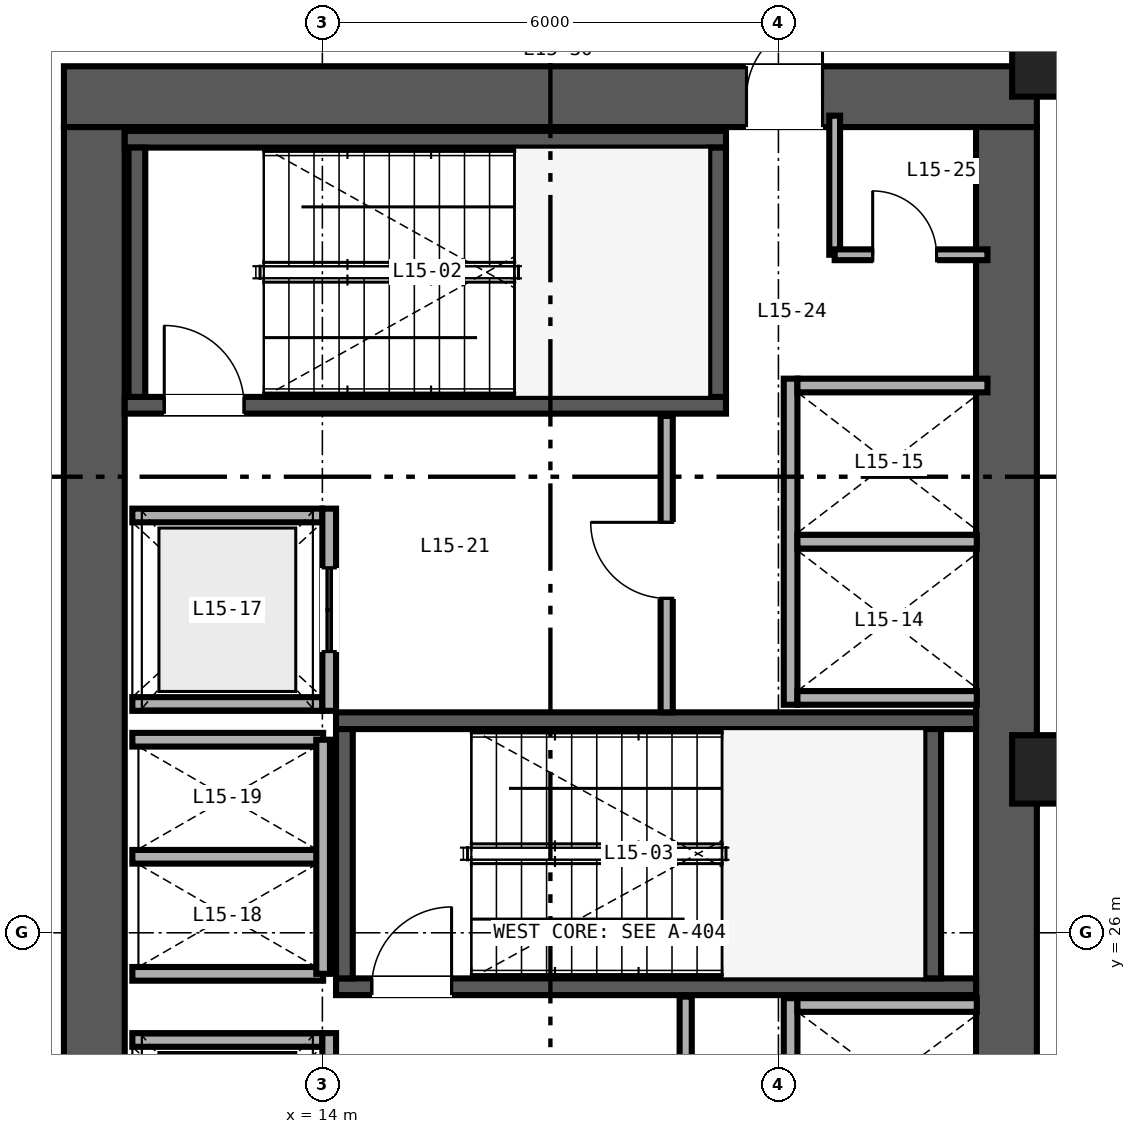
"""IFC4 building model, lengths in metres.
Left out: names, types, materials, properties, quantities, classifications, styles, units other than length and angle.
Written with IfcOpenShell. Run it as: python <this file> out.ifc"""

import sys

from ifc_helpers import new_model, si_unit, direction, frame, frame_2d, origin, origin_2d, place, context, subcontext, project, spatial, rectangle, hollow_rectangle, extrude, source, transform, mapped, element, fill, save


model = new_model("IFC4")
c1 = context("Model", 3, precision=1e-05, world=origin(), true_north=direction((0.0, 1.0)))
c2 = subcontext(c1, "Body", "Model", "MODEL_VIEW")
j1 = project(units=[si_unit("LENGTHUNIT", "METRE"), si_unit("PLANEANGLEUNIT", "RADIAN")], contexts=[c1])
p1 = place(None, origin())
s1 = spatial("IfcSite", under=j1, at=p1, CompositionType="ELEMENT")
p2 = place(p1, origin())
s2 = spatial("IfcBuilding", under=s1, at=p2, CompositionType="ELEMENT")
p3 = place(p2, frame((0.0, 0.0, 63.6)))
s3 = spatial("IfcBuildingStorey", under=s2, at=p3, CompositionType="ELEMENT", Elevation=63.6)
p4 = place(p3, frame((10.6, 37.0, 0.0), z_axis=(0.0, 0.0, 1.0), x_axis=(1.0, 0.0, 0.0)))
e1 = element("IfcWall", 1, at=p4, inside=s3, PredefinedType="SHEAR", context=c2, shape_type="SweptSolid", body=[
    extrude(rectangle(XDim=12.8, YDim=0.8, at=frame_2d((6.4, 0.0))), origin(), (0.0, 0.0, 1.0), 3.35),
])
p5 = place(p4, frame((8.98, 0.0, 0.0)))
e2 = element("IfcOpeningElement", 2, at=p5, cuts=e1, PredefinedType="OPENING", context=c2, shape_type="SweptSolid", body=[
    extrude(rectangle(XDim=1.0, YDim=2.15, at=frame_2d((0.5, 1.075))), frame((0.0, 0.41, 0.0), z_axis=(0.0, -1.0, 0.0), x_axis=(1.0, 0.0, 0.0)), (0.0, 0.0, 1.0), 0.82),
])
for number, where, z_axis, x_axis in (
    (3, (11.0, 15.4, 0.0), (0.0, 0.0, 1.0), (0.0, 1.0, 0.0)),
    (4, (23.0, 15.4, 0.0), (0.0, 0.0, 1.0), (0.0, 1.0, 0.0)),
):
    element("IfcWall", number, at=place(p3, frame(where, z_axis=z_axis, x_axis=x_axis)), inside=s3, PredefinedType="SHEAR", context=c2, shape_type="SweptSolid", body=[
        extrude(rectangle(XDim=21.2, YDim=0.8, at=frame_2d((10.6, 0.0))), origin(), (0.0, 0.0, 1.0), 3.35),
    ])
p6 = place(p3, frame((11.4, 32.94, 0.0), z_axis=(0.0, 0.0, 1.0), x_axis=(1.0, 0.0, 0.0)))
e5 = element("IfcWall", 5, at=p6, inside=s3, PredefinedType="SHEAR", context=c2, shape_type="SweptSolid", body=[
    extrude(rectangle(XDim=7.91, YDim=0.22, at=frame_2d((3.955, 0.0))), origin(), (0.0, 0.0, 1.0), 3.4),
])
p7 = place(p6, frame((0.52, 0.0, 0.0)))
e6 = element("IfcOpeningElement", 6, at=p7, cuts=e5, PredefinedType="OPENING", context=c2, shape_type="SweptSolid", body=[
    extrude(rectangle(XDim=1.05, YDim=2.15, at=frame_2d((0.525, 1.075))), frame((0.0, 0.12, 0.0), z_axis=(0.0, -1.0, 0.0), x_axis=(1.0, 0.0, 0.0)), (0.0, 0.0, 1.0), 0.24),
])
p8 = place(p3, frame((11.4, 36.44, 0.0), z_axis=(0.0, 0.0, 1.0), x_axis=(1.0, 0.0, 0.0)))
e7 = element("IfcWall", 7, at=p8, inside=s3, PredefinedType="SHEAR", context=c2, shape_type="SweptSolid", body=[
    extrude(rectangle(XDim=7.91, YDim=0.22, at=frame_2d((3.955, 0.0))), origin(), (0.0, 0.0, 1.0), 3.4),
])
for number, where, z_axis, x_axis in (
    (8, (11.56, 33.05, 0.0), (0.0, 0.0, 1.0), (0.0, 1.0, 0.0)),
    (9, (19.2, 33.05, 0.0), (0.0, 0.0, 1.0), (0.0, 1.0, 0.0)),
):
    element("IfcWall", number, at=place(p3, frame(where, z_axis=z_axis, x_axis=x_axis)), inside=s3, PredefinedType="SHEAR", context=c2, shape_type="SweptSolid", body=[
        extrude(rectangle(XDim=3.28, YDim=0.22, at=frame_2d((1.64, 0.0))), origin(), (0.0, 0.0, 1.0), 3.4),
    ])
p9 = place(p3, frame((14.18, 25.29, 0.0), z_axis=(0.0, 0.0, 1.0), x_axis=(1.0, 0.0, 0.0)))
e10 = element("IfcWall", 10, at=p9, inside=s3, PredefinedType="SHEAR", context=c2, shape_type="SweptSolid", body=[
    extrude(rectangle(XDim=8.42, YDim=0.22, at=frame_2d((4.21, 0.0))), origin(), (0.0, 0.0, 1.0), 3.4),
])
p10 = place(p9, frame((0.47, 0.0, 0.0)))
e11 = element("IfcOpeningElement", 11, at=p10, cuts=e10, PredefinedType="OPENING", context=c2, shape_type="SweptSolid", body=[
    extrude(rectangle(XDim=1.05, YDim=2.15, at=frame_2d((0.525, 1.075))), frame((0.0, 0.12, 0.0), z_axis=(0.0, -1.0, 0.0), x_axis=(1.0, 0.0, 0.0)), (0.0, 0.0, 1.0), 0.24),
])
p11 = place(p3, frame((14.18, 28.79, 0.0), z_axis=(0.0, 0.0, 1.0), x_axis=(1.0, 0.0, 0.0)))
e12 = element("IfcWall", 12, at=p11, inside=s3, PredefinedType="SHEAR", context=c2, shape_type="SweptSolid", body=[
    extrude(rectangle(XDim=8.42, YDim=0.22, at=frame_2d((4.21, 0.0))), origin(), (0.0, 0.0, 1.0), 3.4),
])
for number, where, z_axis, x_axis in (
    (13, (14.29, 25.4, 0.0), (0.0, 0.0, 1.0), (0.0, 1.0, 0.0)),
    (14, (22.03, 25.4, 0.0), (0.0, 0.0, 1.0), (0.0, 1.0, 0.0)),
):
    element("IfcWall", number, at=place(p3, frame(where, z_axis=z_axis, x_axis=x_axis)), inside=s3, PredefinedType="SHEAR", context=c2, shape_type="SweptSolid", body=[
        extrude(rectangle(XDim=3.28, YDim=0.22, at=frame_2d((1.64, 0.0))), origin(), (0.0, 0.0, 1.0), 3.4),
    ])
m1 = source(origin(), c2, "Body", "SweptSolid", [
    extrude(hollow_rectangle(XDim=0.85, YDim=0.9, WallThickness=0.04, at=origin_2d()), origin(), (0.0, 0.0, 1.0), 3.35),
])
for number, where, z_axis, x_axis in (
    (15, (23.5, 28.15, 0.0), (0.0, 0.0, 1.0), (1.0, 0.0, 0.0)),
    (16, (23.5, 37.45, 0.0), (0.0, 0.0, 1.0), (1.0, 0.0, 0.0)),
):
    element("IfcColumn", number, at=place(p3, frame(where, z_axis=z_axis, x_axis=x_axis)), inside=s3, PredefinedType="COLUMN", context=c2, shape_type="MappedRepresentation", body=[
        mapped(m1, transform((0.0, 0.0, 0.0), scale=1.0)),
    ])
p12 = place(p3, frame((20.16, 18.82, 0.0), z_axis=(0.0, 0.0, 1.0), x_axis=(0.0, 1.0, 0.0)))
e17 = element("IfcWall", 17, at=p12, inside=s3, PredefinedType="SOLIDWALL", context=c2, shape_type="SweptSolid", body=[
    extrude(rectangle(XDim=6.32, YDim=0.18, at=frame_2d((3.16, 0.0))), origin(), (0.0, 0.0, 1.0), 2.36),
])
p13 = place(p3, frame((20.25, 25.05, 0.0), z_axis=(0.0, 0.0, 1.0), x_axis=(1.0, 0.0, 0.0)))
e18 = element("IfcWall", 18, at=p13, inside=s3, PredefinedType="SOLIDWALL", context=c2, shape_type="SweptSolid", body=[
    extrude(rectangle(XDim=2.36, YDim=0.18, at=frame_2d((1.18, 0.0))), origin(), (0.0, 0.0, 1.0), 3.35),
])
p14 = place(p3, frame((20.16, 29.0, 0.0), z_axis=(0.0, 0.0, 1.0), x_axis=(0.0, 1.0, 0.0)))
e19 = element("IfcWall", 19, at=p14, inside=s3, PredefinedType="SOLIDWALL", context=c2, shape_type="SweptSolid", body=[
    extrude(rectangle(XDim=4.29, YDim=0.18, at=frame_2d((2.145, 0.0))), origin(), (0.0, 0.0, 1.0), 3.35),
])
p15 = place(p3, frame((20.25, 29.09, 0.0), z_axis=(0.0, 0.0, 1.0), x_axis=(1.0, 0.0, 0.0)))
e20 = element("IfcWall", 20, at=p15, inside=s3, PredefinedType="SOLIDWALL", context=c2, shape_type="SweptSolid", body=[
    extrude(rectangle(XDim=2.36, YDim=0.18, at=frame_2d((1.18, 0.0))), origin(), (0.0, 0.0, 1.0), 3.35),
])
p16 = place(p3, frame((20.25, 33.2, 0.0), z_axis=(0.0, 0.0, 1.0), x_axis=(1.0, 0.0, 0.0)))
e21 = element("IfcWall", 21, at=p16, inside=s3, PredefinedType="SOLIDWALL", context=c2, shape_type="SweptSolid", body=[
    extrude(rectangle(XDim=2.5, YDim=0.18, at=frame_2d((1.25, 0.0))), origin(), (0.0, 0.0, 1.0), 3.35),
])
p17 = place(p3, frame((20.25, 31.145, 0.0), z_axis=(0.0, 0.0, 1.0), x_axis=(1.0, 0.0, 0.0)))
e22 = element("IfcWall", 22, at=p17, inside=s3, PredefinedType="SOLIDWALL", context=c2, shape_type="SweptSolid", body=[
    extrude(rectangle(XDim=2.36, YDim=0.18, at=frame_2d((1.18, 0.0))), origin(), (0.0, 0.0, 1.0), 3.35),
])
p18 = place(p3, frame((11.5, 24.59, 0.0), z_axis=(0.0, 0.0, 1.0), x_axis=(1.0, 0.0, 0.0)))
e23 = element("IfcWall", 23, at=p18, inside=s3, PredefinedType="SOLIDWALL", context=c2, shape_type="SweptSolid", body=[
    extrude(rectangle(XDim=2.5, YDim=0.18, at=frame_2d((1.25, 0.0))), origin(), (0.0, 0.0, 1.0), 3.35),
])
p19 = place(p3, frame((14.09, 22.02, 0.0), z_axis=(0.0, 0.0, 1.0), x_axis=(0.0, 1.0, 0.0)))
e24 = element("IfcWall", 24, at=p19, inside=s3, PredefinedType="SOLIDWALL", context=c2, shape_type="SweptSolid", body=[
    extrude(rectangle(XDim=2.66, YDim=0.18, at=frame_2d((1.33, 0.0))), origin(), (0.0, 0.0, 1.0), 3.35),
])
p20 = place(p19, frame((0.78, 0.0, 0.0)))
e25 = element("IfcOpeningElement", 25, at=p20, cuts=e24, PredefinedType="OPENING", context=c2, shape_type="SweptSolid", body=[
    extrude(rectangle(XDim=1.1, YDim=2.2, at=frame_2d((0.55, 1.1))), frame((0.0, 0.1, 0.0), z_axis=(0.0, -1.0, 0.0), x_axis=(1.0, 0.0, 0.0)), (0.0, 0.0, 1.0), 0.2),
])
for number, where, z_axis, x_axis in (
    (26, (11.5, 29.01, 0.0), (0.0, 0.0, 1.0), (1.0, 0.0, 0.0)),
    (27, (11.5, 31.49, 0.0), (0.0, 0.0, 1.0), (1.0, 0.0, 0.0)),
):
    element("IfcWall", number, at=place(p3, frame(where, z_axis=z_axis, x_axis=x_axis)), inside=s3, PredefinedType="SOLIDWALL", context=c2, shape_type="SweptSolid", body=[
        extrude(rectangle(XDim=2.5, YDim=0.18, at=frame_2d((1.25, 0.0))), origin(), (0.0, 0.0, 1.0), 3.35),
    ])
p21 = place(p3, frame((14.09, 28.92, 0.0), z_axis=(0.0, 0.0, 1.0), x_axis=(0.0, 1.0, 0.0)))
e28 = element("IfcWall", 28, at=p21, inside=s3, PredefinedType="SOLIDWALL", context=c2, shape_type="SweptSolid", body=[
    extrude(rectangle(XDim=2.66, YDim=0.18, at=frame_2d((1.33, 0.0))), origin(), (0.0, 0.0, 1.0), 3.35),
])
p22 = place(p21, frame((0.78, 0.0, 0.0)))
e29 = element("IfcOpeningElement", 29, at=p22, cuts=e28, PredefinedType="OPENING", context=c2, shape_type="SweptSolid", body=[
    extrude(rectangle(XDim=1.1, YDim=2.2, at=frame_2d((0.55, 1.1))), frame((0.0, 0.1, 0.0), z_axis=(0.0, -1.0, 0.0), x_axis=(1.0, 0.0, 0.0)), (0.0, 0.0, 1.0), 0.2),
])
for number, where, z_axis, x_axis in (
    (30, (11.5, 25.46, 0.0), (0.0, 0.0, 1.0), (1.0, 0.0, 0.0)),
    (31, (11.5, 27.0, 0.0), (0.0, 0.0, 1.0), (1.0, 0.0, 0.0)),
    (32, (11.5, 28.54, 0.0), (0.0, 0.0, 1.0), (1.0, 0.0, 0.0)),
):
    element("IfcWall", number, at=place(p3, frame(where, z_axis=z_axis, x_axis=x_axis)), inside=s3, PredefinedType="SOLIDWALL", context=c2, shape_type="SweptSolid", body=[
        extrude(rectangle(XDim=2.51, YDim=0.18, at=frame_2d((1.255, 0.0))), origin(), (0.0, 0.0, 1.0), 3.35),
    ])
p23 = place(p3, frame((14.01, 25.46, 0.0), z_axis=(0.0, 0.0, 1.0), x_axis=(0.0, 1.0, 0.0)))
e33 = element("IfcWall", 33, at=p23, inside=s3, PredefinedType="SOLIDWALL", context=c2, shape_type="SweptSolid", body=[
    extrude(rectangle(XDim=3.08, YDim=0.18, at=frame_2d((1.54, 0.0))), origin(), (0.0, 0.0, 1.0), 3.35),
])
p24 = place(p3, frame((18.78, 21.35, 0.0), z_axis=(0.0, 0.0, 1.0), x_axis=(0.0, 1.0, 0.0)))
e34 = element("IfcWall", 34, at=p24, inside=s3, PredefinedType="PARTITIONING", context=c2, shape_type="SweptSolid", body=[
    extrude(rectangle(XDim=3.81, YDim=0.16, at=frame_2d((1.905, 0.0))), origin(), (0.0, 0.0, 1.0), 3.35),
])
p25 = place(p3, frame((18.53, 28.9, 0.0), z_axis=(0.0, 0.0, 1.0), x_axis=(0.0, 1.0, 0.0)))
e35 = element("IfcWall", 35, at=p25, inside=s3, PredefinedType="PARTITIONING", context=c2, shape_type="SweptSolid", body=[
    extrude(rectangle(XDim=3.9, YDim=0.16, at=frame_2d((1.95, 0.0))), origin(), (0.0, 0.0, 1.0), 3.35),
])
p26 = place(p25, frame((1.5, 0.0, 0.0)))
e36 = element("IfcOpeningElement", 36, at=p26, cuts=e35, PredefinedType="OPENING", context=c2, shape_type="SweptSolid", body=[
    extrude(rectangle(XDim=1.0, YDim=2.15, at=frame_2d((0.5, 1.075))), frame((0.0, 0.09, 0.0), z_axis=(0.0, -1.0, 0.0), x_axis=(1.0, 0.0, 0.0)), (0.0, 0.0, 1.0), 0.18),
])
p27 = place(p3, frame((20.74, 34.92, 0.0), z_axis=(0.0, 0.0, 1.0), x_axis=(0.0, 1.0, 0.0)))
e37 = element("IfcWall", 37, at=p27, inside=s3, PredefinedType="PARTITIONING", context=c2, shape_type="SweptSolid", body=[
    extrude(rectangle(XDim=1.83, YDim=0.142, at=frame_2d((0.915, 0.0))), origin(), (0.0, 0.0, 1.0), 3.35),
])
p28 = place(p3, frame((20.74, 34.92, 0.0), z_axis=(0.0, 0.0, 1.0), x_axis=(1.0, 0.0, 0.0)))
e38 = element("IfcWall", 38, at=p28, inside=s3, PredefinedType="PARTITIONING", context=c2, shape_type="SweptSolid", body=[
    extrude(rectangle(XDim=2.01, YDim=0.142, at=frame_2d((1.005, 0.0))), origin(), (0.0, 0.0, 1.0), 3.35),
])
p29 = place(p28, frame((0.5, 0.0, 0.0)))
e39 = element("IfcOpeningElement", 39, at=p29, cuts=e38, PredefinedType="OPENING", context=c2, shape_type="SweptSolid", body=[
    extrude(rectangle(XDim=0.84, YDim=2.1, at=frame_2d((0.42, 1.05))), frame((0.0, 0.081, 0.0), z_axis=(0.0, -1.0, 0.0), x_axis=(1.0, 0.0, 0.0)), (0.0, 0.0, 1.0), 0.162),
])
m2 = source(origin(), c2, "Body", "SweptSolid", [
    extrude(rectangle(XDim=1.05, YDim=2.15, at=frame_2d((0.525, 1.075))), frame((0.0, 0.025, 0.0), z_axis=(0.0, -1.0, 0.0), x_axis=(1.0, 0.0, 0.0)), (0.0, 0.0, 1.0), 0.05),
])
p30 = place(p7, origin())
e40 = element("IfcDoor", 40, at=p30, inside=s3, OperationType="SINGLE_SWING_LEFT", PredefinedType="DOOR", context=c2, shape_type="MappedRepresentation", body=[
    mapped(m2, transform((0.0, 0.0, 0.0), scale=1.0)),
])
fill(e6, e40)
p31 = place(p10, origin())
e41 = element("IfcDoor", 41, at=p31, inside=s3, OperationType="SINGLE_SWING_RIGHT", PredefinedType="DOOR", context=c2, shape_type="MappedRepresentation", body=[
    mapped(m2, transform((0.0, 0.0, 0.0), scale=1.0)),
])
fill(e11, e41)
m3 = source(origin(), c2, "Body", "SweptSolid", [
    extrude(rectangle(XDim=1.1, YDim=2.2, at=frame_2d((0.55, 1.1))), frame((0.0, 0.025, 0.0), z_axis=(0.0, -1.0, 0.0), x_axis=(1.0, 0.0, 0.0)), (0.0, 0.0, 1.0), 0.05),
])
p32 = place(p22, origin())
e42 = element("IfcDoor", 42, at=p32, inside=s3, OperationType="DOUBLE_DOOR_SLIDING", PredefinedType="DOOR", context=c2, shape_type="MappedRepresentation", body=[
    mapped(m3, transform((0.0, 0.0, 0.0), scale=1.0)),
])
fill(e29, e42)
m4 = source(origin(), c2, "Body", "SweptSolid", [
    extrude(rectangle(XDim=1.0, YDim=2.15, at=frame_2d((0.5, 1.075))), frame((0.0, 0.025, 0.0), z_axis=(0.0, -1.0, 0.0), x_axis=(1.0, 0.0, 0.0)), (0.0, 0.0, 1.0), 0.05),
])
p33 = place(p26, origin())
e43 = element("IfcDoor", 43, at=p33, inside=s3, OperationType="SINGLE_SWING_RIGHT", PredefinedType="DOOR", context=c2, shape_type="MappedRepresentation", body=[
    mapped(m4, transform((0.0, 0.0, 0.0), scale=1.0)),
])
fill(e36, e43)
m5 = source(origin(), c2, "Body", "SweptSolid", [
    extrude(rectangle(XDim=0.84, YDim=2.1, at=frame_2d((0.42, 1.05))), frame((0.0, 0.025, 0.0), z_axis=(0.0, -1.0, 0.0), x_axis=(1.0, 0.0, 0.0)), (0.0, 0.0, 1.0), 0.05),
])
p34 = place(p29, origin())
e44 = element("IfcDoor", 44, at=p34, inside=s3, OperationType="SINGLE_SWING_LEFT", PredefinedType="DOOR", context=c2, shape_type="MappedRepresentation", body=[
    mapped(m5, transform((0.0, 0.0, 0.0), scale=1.0)),
])
fill(e39, e44)
p35 = place(p5, origin())
e45 = element("IfcDoor", 45, at=p35, inside=s3, OperationType="SINGLE_SWING_RIGHT", PredefinedType="DOOR", context=c2, shape_type="MappedRepresentation", body=[
    mapped(m4, transform((0.0, 0.0, 0.0), scale=1.0)),
])
fill(e2, e45)
save(model, sys.argv[1])
